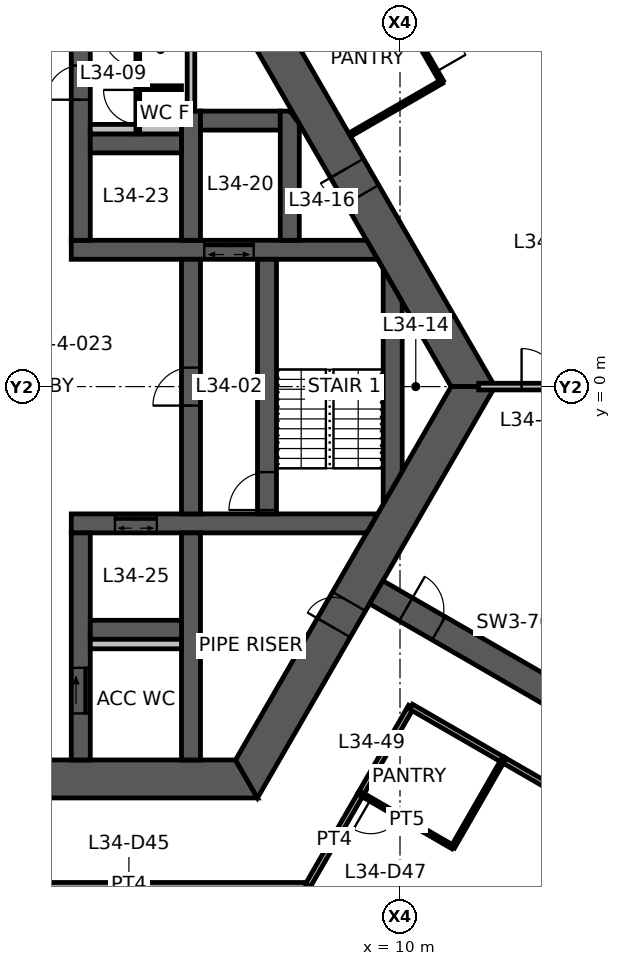
"""IFC4 building model, lengths in metres.
Left out: names, types, materials, properties, quantities, classifications, styles, units other than length and angle.
Written with IfcOpenShell. Run it as: python <this file> out.ifc"""

import sys

from ifc_helpers import new_model, si_unit, direction, frame, frame_2d, origin, place, context, subcontext, project, spatial, polyline, rectangle, outline, extrude, element, fill, save


model = new_model("IFC4")
c1 = context("Model", 3, precision=1e-05, world=origin(), true_north=direction((0.0, 1.0)))
c2 = subcontext(c1, "Body", "Model", "MODEL_VIEW")
j1 = project(units=[si_unit("LENGTHUNIT", "METRE"), si_unit("PLANEANGLEUNIT", "RADIAN")], contexts=[c1])
p1 = place(None, origin())
s1 = spatial("IfcSite", under=j1, at=p1, CompositionType="ELEMENT")
p2 = place(p1, origin())
s2 = spatial("IfcBuilding", under=s1, at=p2, CompositionType="ELEMENT")
p3 = place(p2, frame((0.0, 0.0, 137.0)))
s3 = spatial("IfcBuildingStorey", under=s2, at=p3, CompositionType="ELEMENT", Elevation=137.0)
p4 = place(p3, frame((11.922, 0.0, 0.0), z_axis=(0.0, 0.0, 1.0), x_axis=(-0.500004296715, 0.866022923061, 0.0)))
e1 = element("IfcWall", 1, at=p4, inside=s3, PredefinedType="SHEAR", context=c2, shape_type="SweptSolid", body=[
    extrude(outline(polyline([(-0.289, -0.5), (5.835, -0.5), (6.635, -0.5), (12.211, -0.5), (11.634, 0.5), (6.635, 0.5), (5.835, 0.5), (0.289, 0.5), (-0.289, -0.5)])), origin(), (0.0, 0.0, 1.0), 3.9),
])
p5 = place(p4, frame((5.835, 0.0, 0.0)))
e2 = element("IfcOpeningElement", 2, at=p5, cuts=e1, PredefinedType="OPENING", context=c2, shape_type="SweptSolid", body=[
    extrude(rectangle(XDim=0.8, YDim=2.1, at=frame_2d((0.4, 1.05))), frame((0.0, 0.51, 0.0), z_axis=(0.0, -1.0, 0.0), x_axis=(1.0, 0.0, 0.0)), (0.0, 0.0, 1.0), 1.02),
])
p6 = place(p3, frame((-5.961, -10.325, 0.0), z_axis=(0.0, 0.0, 1.0), x_axis=(1.0, 0.0, 0.0)))
e3 = element("IfcWall", 3, at=p6, inside=s3, PredefinedType="SHEAR", context=c2, shape_type="SweptSolid", body=[
    extrude(outline(polyline([(-0.289, -0.5), (5.461, -0.5), (6.461, -0.5), (12.211, -0.5), (11.634, 0.5), (6.461, 0.5), (5.461, 0.5), (0.289, 0.5), (-0.289, -0.5)])), origin(), (0.0, 0.0, 1.0), 3.9),
])
p7 = place(p6, frame((5.461, 0.0, 0.0)))
e4 = element("IfcOpeningElement", 4, at=p7, cuts=e3, PredefinedType="OPENING", context=c2, shape_type="SweptSolid", body=[
    extrude(rectangle(XDim=1.0, YDim=2.1, at=frame_2d((0.5, 1.05))), frame((0.0, 0.51, 0.0), z_axis=(0.0, -1.0, 0.0), x_axis=(1.0, 0.0, 0.0)), (0.0, 0.0, 1.0), 1.02),
])
p8 = place(p3, frame((5.961, -10.325, 0.0), z_axis=(0.0, 0.0, 1.0), x_axis=(0.500004296715, 0.866022923061, 0.0)))
e5 = element("IfcWall", 5, at=p8, inside=s3, PredefinedType="SHEAR", context=c2, shape_type="SweptSolid", body=[
    extrude(outline(polyline([(-0.289, -0.5), (4.594, -0.5), (5.394, -0.5), (12.211, -0.5), (11.634, 0.5), (5.394, 0.5), (4.594, 0.5), (0.289, 0.5), (-0.289, -0.5)])), origin(), (0.0, 0.0, 1.0), 3.9),
])
p9 = place(p8, frame((4.594, 0.0, 0.0)))
e6 = element("IfcOpeningElement", 6, at=p9, cuts=e5, PredefinedType="OPENING", context=c2, shape_type="SweptSolid", body=[
    extrude(rectangle(XDim=0.8, YDim=2.1, at=frame_2d((0.4, 1.05))), frame((0.0, 0.51, 0.0), z_axis=(0.0, -1.0, 0.0), x_axis=(1.0, 0.0, 0.0)), (0.0, 0.0, 1.0), 1.02),
])
p10 = place(p3, frame((9.375, -5.413, 0.0), z_axis=(0.0, 0.0, 1.0), x_axis=(0.866032377459, -0.499987921047, 0.0)))
e7 = element("IfcWall", 7, at=p10, inside=s3, PredefinedType="SHEAR", context=c2, shape_type="SweptSolid", body=[
    extrude(rectangle(XDim=7.696, YDim=0.7, at=frame_2d((3.848, 0.0))), origin(), (0.0, 0.0, 1.0), 3.9),
])
p11 = place(p10, frame((0.9, 0.0, 0.0)))
e8 = element("IfcOpeningElement", 8, at=p11, cuts=e7, PredefinedType="OPENING", context=c2, shape_type="SweptSolid", body=[
    extrude(rectangle(XDim=1.0, YDim=2.1, at=frame_2d((0.5, 1.05))), frame((0.0, 0.36, 0.0), z_axis=(0.0, -1.0, 0.0), x_axis=(1.0, 0.0, 0.0)), (0.0, 0.0, 1.0), 0.72),
])
p12 = place(p3, frame((1.35, 3.6, 0.0), z_axis=(0.0, 0.0, 1.0), x_axis=(1.0, 0.0, 0.0)))
e9 = element("IfcWall", 9, at=p12, inside=s3, PredefinedType="SHEAR", context=c2, shape_type="SweptSolid", body=[
    extrude(outline(polyline([(0.0, -0.25), (3.5, -0.25), (4.8, -0.25), (8.061, -0.25), (7.772, 0.25), (4.8, 0.25), (3.5, 0.25), (0.0, 0.25), (0.0, -0.25)])), origin(), (0.0, 0.0, 1.0), 3.9),
])
p13 = place(p12, frame((3.5, 0.0, 0.0)))
e10 = element("IfcOpeningElement", 10, at=p13, cuts=e9, PredefinedType="OPENING", context=c2, shape_type="SweptSolid", body=[
    extrude(rectangle(XDim=1.3, YDim=2.1, at=frame_2d((0.65, 1.05))), frame((0.0, 0.26, 0.0), z_axis=(0.0, -1.0, 0.0), x_axis=(1.0, 0.0, 0.0)), (0.0, 0.0, 1.0), 0.52),
])
p14 = place(p3, frame((1.35, -3.6, 0.0), z_axis=(0.0, 0.0, 1.0), x_axis=(1.0, 0.0, 0.0)))
e11 = element("IfcWall", 11, at=p14, inside=s3, PredefinedType="SHEAR", context=c2, shape_type="SweptSolid", body=[
    extrude(outline(polyline([(0.0, -0.25), (1.15, -0.25), (2.25, -0.25), (7.772, -0.25), (8.061, 0.25), (2.25, 0.25), (1.15, 0.25), (0.0, 0.25), (0.0, -0.25)])), origin(), (0.0, 0.0, 1.0), 3.9),
])
p15 = place(p14, frame((1.15, 0.0, 0.0)))
e12 = element("IfcOpeningElement", 12, at=p15, cuts=e11, PredefinedType="OPENING", context=c2, shape_type="SweptSolid", body=[
    extrude(rectangle(XDim=1.1, YDim=2.1, at=frame_2d((0.55, 1.05))), frame((0.0, 0.26, 0.0), z_axis=(0.0, -1.0, 0.0), x_axis=(1.0, 0.0, 0.0)), (0.0, 0.0, 1.0), 0.52),
])
p16 = place(p3, frame((1.6, 3.85, 0.0), z_axis=(0.0, 0.0, 1.0), x_axis=(0.0, 1.0, 0.0)))
e13 = element("IfcWall", 13, at=p16, inside=s3, PredefinedType="SHEAR", context=c2, shape_type="SweptSolid", body=[
    extrude(rectangle(XDim=5.975, YDim=0.5, at=frame_2d((2.987, 0.0))), origin(), (0.0, 0.0, 1.0), 3.9),
])
p17 = place(p16, frame((3.7, 0.0, 0.0)))
e14 = element("IfcOpeningElement", 14, at=p17, cuts=e13, PredefinedType="OPENING", context=c2, shape_type="SweptSolid", body=[
    extrude(rectangle(XDim=0.9, YDim=2.1, at=frame_2d((0.45, 1.05))), frame((0.0, 0.26, 0.0), z_axis=(0.0, -1.0, 0.0), x_axis=(1.0, 0.0, 0.0)), (0.0, 0.0, 1.0), 0.52),
])
p18 = place(p3, frame((1.6, -3.85, 0.0), z_axis=(0.0, 0.0, 1.0), x_axis=(0.0, -1.0, 0.0)))
e15 = element("IfcWall", 15, at=p18, inside=s3, PredefinedType="SHEAR", context=c2, shape_type="SweptSolid", body=[
    extrude(rectangle(XDim=5.975, YDim=0.5, at=frame_2d((2.987, 0.0))), origin(), (0.0, 0.0, 1.0), 3.9),
])
p19 = place(p18, frame((3.55, 0.0, 0.0)))
e16 = element("IfcOpeningElement", 16, at=p19, cuts=e15, PredefinedType="OPENING", context=c2, shape_type="SweptSolid", body=[
    extrude(rectangle(XDim=1.2, YDim=2.1, at=frame_2d((0.6, 1.05))), frame((0.0, 0.26, 0.0), z_axis=(0.0, -1.0, 0.0), x_axis=(1.0, 0.0, 0.0)), (0.0, 0.0, 1.0), 0.52),
])
p20 = place(p3, frame((4.5, -3.35, 0.0), z_axis=(0.0, 0.0, 1.0), x_axis=(0.0, 1.0, 0.0)))
e17 = element("IfcWall", 17, at=p20, inside=s3, PredefinedType="SHEAR", context=c2, shape_type="SweptSolid", body=[
    extrude(rectangle(XDim=6.7, YDim=0.5, at=frame_2d((3.35, 0.0))), origin(), (0.0, 0.0, 1.0), 3.9),
])
p21 = place(p20, frame((2.85, 0.0, 0.0)))
e18 = element("IfcOpeningElement", 18, at=p21, cuts=e17, PredefinedType="OPENING", context=c2, shape_type="SweptSolid", body=[
    extrude(rectangle(XDim=1.0, YDim=2.1, at=frame_2d((0.5, 1.05))), frame((0.0, 0.26, 0.0), z_axis=(0.0, -1.0, 0.0), x_axis=(1.0, 0.0, 0.0)), (0.0, 0.0, 1.0), 0.52),
])
p22 = place(p3, frame((6.5, -3.35, 0.0), z_axis=(0.0, 0.0, 1.0), x_axis=(0.0, 1.0, 0.0)))
e19 = element("IfcWall", 19, at=p22, inside=s3, PredefinedType="SHEAR", context=c2, shape_type="SweptSolid", body=[
    extrude(rectangle(XDim=6.7, YDim=0.5, at=frame_2d((3.35, 0.0))), origin(), (0.0, 0.0, 1.0), 3.9),
])
p23 = place(p22, frame((0.1, 0.0, 0.0)))
e20 = element("IfcOpeningElement", 20, at=p23, cuts=e19, PredefinedType="OPENING", context=c2, shape_type="SweptSolid", body=[
    extrude(rectangle(XDim=1.0, YDim=2.1, at=frame_2d((0.5, 1.05))), frame((0.0, 0.26, 0.0), z_axis=(0.0, -1.0, 0.0), x_axis=(1.0, 0.0, 0.0)), (0.0, 0.0, 1.0), 0.52),
])
p24 = place(p3, frame((4.5, 3.85, 0.0), z_axis=(0.0, 0.0, 1.0), x_axis=(0.0, 1.0, 0.0)))
e21 = element("IfcWall", 21, at=p24, inside=s3, PredefinedType="SHEAR", context=c2, shape_type="SweptSolid", body=[
    extrude(rectangle(XDim=3.4, YDim=0.5, at=frame_2d((1.7, 0.0))), origin(), (0.0, 0.0, 1.0), 3.9),
])
p25 = place(p3, frame((4.5, -3.85, 0.0), z_axis=(0.0, 0.0, 1.0), x_axis=(0.0, -1.0, 0.0)))
e22 = element("IfcWall", 22, at=p25, inside=s3, PredefinedType="SHEAR", context=c2, shape_type="SweptSolid", body=[
    extrude(rectangle(XDim=5.975, YDim=0.5, at=frame_2d((2.987, 0.0))), origin(), (0.0, 0.0, 1.0), 3.9),
])
for number, where, z_axis, x_axis in (
    (23, (1.85, 6.4, 0.0), (0.0, 0.0, 1.0), (1.0, 0.0, 0.0)),
    (24, (1.85, -6.4, 0.0), (0.0, 0.0, 1.0), (1.0, 0.0, 0.0)),
):
    element("IfcWall", number, at=place(p3, frame(where, z_axis=z_axis, x_axis=x_axis)), inside=s3, PredefinedType="SHEAR", context=c2, shape_type="SweptSolid", body=[
        extrude(rectangle(XDim=2.4, YDim=0.5, at=frame_2d((1.2, 0.0))), origin(), (0.0, 0.0, 1.0), 3.9),
    ])
p26 = place(p3, frame((4.75, 7.0, 0.0), z_axis=(0.0, 0.0, 1.0), x_axis=(1.0, 0.0, 0.0)))
e25 = element("IfcWall", 25, at=p26, inside=s3, PredefinedType="SHEAR", context=c2, shape_type="SweptSolid", body=[
    extrude(rectangle(XDim=2.1, YDim=0.5, at=frame_2d((1.05, 0.0))), origin(), (0.0, 0.0, 1.0), 3.9),
])
p27 = place(p3, frame((7.1, 3.85, 0.0), z_axis=(0.0, 0.0, 1.0), x_axis=(0.0, 1.0, 0.0)))
e26 = element("IfcWall", 26, at=p27, inside=s3, PredefinedType="SHEAR", context=c2, shape_type="SweptSolid", body=[
    extrude(outline(polyline([(0.0, -0.25), (3.069, -0.25), (3.4, 0.0), (3.4, 0.25), (0.0, 0.25), (0.0, -0.25)])), origin(), (0.0, 0.0, 1.0), 3.9),
])
p28 = place(p3, frame((9.808, -2.662, 0.0), z_axis=(0.0, 0.0, 1.0), x_axis=(0.0, 1.0, 0.0)))
e27 = element("IfcWall", 27, at=p28, inside=s3, PredefinedType="SHEAR", context=c2, shape_type="SweptSolid", body=[
    extrude(outline(polyline([(0.433, -0.25), (4.892, -0.25), (5.758, 0.25), (-0.433, 0.25), (0.433, -0.25)])), origin(), (0.0, 0.0, 1.0), 3.9),
])
p29 = place(p3, frame((4.5, 7.25, 0.0), z_axis=(0.0, 0.0, 1.0), x_axis=(0.0, 1.0, 0.0)))
e28 = element("IfcWall", 28, at=p29, inside=s3, PredefinedType="STANDARD", context=c2, shape_type="SweptSolid", body=[
    extrude(rectangle(XDim=2.575, YDim=0.2, at=frame_2d((1.288, 0.0))), origin(), (0.0, 0.0, 1.0), 3.9),
])
for number, where, z_axis, x_axis in (
    (29, (1.85, 6.775, 0.0), (0.0, 0.0, 1.0), (1.0, 0.0, 0.0)),
    (30, (1.85, -6.775, 0.0), (0.0, 0.0, 1.0), (1.0, 0.0, 0.0)),
):
    element("IfcWall", number, at=place(p3, frame(where, z_axis=z_axis, x_axis=x_axis)), inside=s3, PredefinedType="PLUMBINGWALL", context=c2, shape_type="SweptSolid", body=[
        extrude(rectangle(XDim=2.4, YDim=0.25, at=frame_2d((1.2, 0.0))), origin(), (0.0, 0.0, 1.0), 3.9),
    ])
p30 = place(p3, frame((3.1, 6.65, 0.0), z_axis=(0.0, 0.0, 1.0), x_axis=(0.0, 1.0, 0.0)))
e31 = element("IfcWall", 31, at=p30, inside=s3, PredefinedType="PARTITIONING", context=c2, shape_type="SweptSolid", body=[
    extrude(rectangle(XDim=3.175, YDim=0.1, at=frame_2d((1.587, 0.0))), origin(), (0.0, 0.0, 1.0), 2.95),
])
p31 = place(p30, frame((0.258, 0.0, 0.0)))
e32 = element("IfcOpeningElement", 32, at=p31, cuts=e31, PredefinedType="OPENING", context=c2, shape_type="SweptSolid", body=[
    extrude(rectangle(XDim=0.9, YDim=2.1, at=frame_2d((0.45, 1.05))), frame((0.0, 0.06, 0.0), z_axis=(0.0, -1.0, 0.0), x_axis=(1.0, 0.0, 0.0)), (0.0, 0.0, 1.0), 0.12),
])
p32 = place(p30, frame((1.771, 0.0, 0.0)))
e33 = element("IfcOpeningElement", 33, at=p32, cuts=e31, PredefinedType="OPENING", context=c2, shape_type="SweptSolid", body=[
    extrude(rectangle(XDim=0.9, YDim=2.1, at=frame_2d((0.45, 1.05))), frame((0.0, 0.06, 0.0), z_axis=(0.0, -1.0, 0.0), x_axis=(1.0, 0.0, 0.0)), (0.0, 0.0, 1.0), 0.12),
])
p33 = place(p3, frame((3.15, 7.866, 0.0), z_axis=(0.0, 0.0, 1.0), x_axis=(1.0, 0.0, 0.0)))
e34 = element("IfcWall", 34, at=p33, inside=s3, PredefinedType="PARTITIONING", context=c2, shape_type="SweptSolid", body=[
    extrude(rectangle(XDim=1.1, YDim=0.1, at=frame_2d((0.55, 0.0))), origin(), (0.0, 0.0, 1.0), 2.95),
])
p34 = place(p3, frame((12.07, 0.0, 0.0), z_axis=(0.0, 0.0, 1.0), x_axis=(1.0, 0.0, 0.0)))
e35 = element("IfcWall", 35, at=p34, inside=s3, PredefinedType="PARTITIONING", context=c2, shape_type="SweptSolid", body=[
    extrude(rectangle(XDim=7.93, YDim=0.175, at=frame_2d((3.965, 0.0))), origin(), (0.0, 0.0, 1.0), 3.05),
])
p35 = place(p34, frame((1.13, 0.0, 0.0)))
e36 = element("IfcOpeningElement", 36, at=p35, cuts=e35, PredefinedType="OPENING", context=c2, shape_type="SweptSolid", body=[
    extrude(rectangle(XDim=1.0, YDim=2.1, at=frame_2d((0.5, 1.05))), frame((0.0, 0.098, 0.0), z_axis=(0.0, -1.0, 0.0), x_axis=(1.0, 0.0, 0.0)), (0.0, 0.0, 1.0), 0.195),
])
p36 = place(p3, frame((9.6, 10.623, 0.0), z_axis=(0.0, 0.0, 1.0), x_axis=(0.499990139034, -0.866031096941, 0.0)))
e37 = element("IfcWall", 37, at=p36, inside=s3, PredefinedType="PARTITIONING", context=c2, shape_type="SweptSolid", body=[
    extrude(rectangle(XDim=3.0, YDim=0.1, at=frame_2d((1.5, 0.0))), origin(), (0.0, 0.0, 1.0), 2.95),
])
p37 = place(p36, frame((1.8, 0.0, 0.0)))
e38 = element("IfcOpeningElement", 38, at=p37, cuts=e37, PredefinedType="OPENING", context=c2, shape_type="SweptSolid", body=[
    extrude(rectangle(XDim=0.9, YDim=2.1, at=frame_2d((0.45, 1.05))), frame((0.0, 0.06, 0.0), z_axis=(0.0, -1.0, 0.0), x_axis=(1.0, 0.0, 0.0)), (0.0, 0.0, 1.0), 0.12),
])
p38 = place(p3, frame((11.1, 8.025, 0.0), z_axis=(0.0, 0.0, 1.0), x_axis=(-0.866056901187, -0.49994544093, 0.0)))
e39 = element("IfcWall", 39, at=p38, inside=s3, PredefinedType="PARTITIONING", context=c2, shape_type="SweptSolid", body=[
    extrude(rectangle(XDim=2.78, YDim=0.1, at=frame_2d((1.39, 0.0))), origin(), (0.0, 0.0, 1.0), 2.95),
])
p39 = place(p3, frame((10.292, -8.425, 0.0), z_axis=(0.0, 0.0, 1.0), x_axis=(-0.499966561876, -0.866044708433, 0.0)))
e40 = element("IfcWall", 40, at=p39, inside=s3, PredefinedType="PARTITIONING", context=c2, shape_type="SweptSolid", body=[
    extrude(rectangle(XDim=2.655, YDim=0.15, at=frame_2d((1.328, 0.0))), origin(), (0.0, 0.0, 1.0), 2.95),
])
p40 = place(p3, frame((12.721, -9.827, 0.0), z_axis=(0.0, 0.0, 1.0), x_axis=(-0.866049342339, 0.499958534914, 0.0)))
e41 = element("IfcWall", 41, at=p40, inside=s3, PredefinedType="PARTITIONING", context=c2, shape_type="SweptSolid", body=[
    extrude(rectangle(XDim=2.805, YDim=0.15, at=frame_2d((1.402, 0.0))), origin(), (0.0, 0.0, 1.0), 2.95),
])
p41 = place(p3, frame((7.578, -13.125, 0.0), z_axis=(0.0, 0.0, 1.0), x_axis=(-1.0, 0.0, 0.0)))
e42 = element("IfcWall", 42, at=p41, inside=s3, PredefinedType="PARTITIONING", context=c2, shape_type="SweptSolid", body=[
    extrude(rectangle(XDim=9.422, YDim=0.15, at=frame_2d((4.711, 0.0))), origin(), (0.0, 0.0, 1.0), 2.95),
])
p42 = place(p41, frame((4.211, 0.0, 0.0)))
e43 = element("IfcOpeningElement", 43, at=p42, cuts=e42, PredefinedType="OPENING", context=c2, shape_type="SweptSolid", body=[
    extrude(rectangle(XDim=1.0, YDim=2.1, at=frame_2d((0.5, 1.05))), frame((0.0, 0.085, 0.0), z_axis=(0.0, -1.0, 0.0), x_axis=(1.0, 0.0, 0.0)), (0.0, 0.0, 1.0), 0.17),
])
p43 = place(p3, frame((8.969, -10.716, 0.0), z_axis=(0.0, 0.0, 1.0), x_axis=(-0.500008568482, -0.866020456713, 0.0)))
e44 = element("IfcWall", 44, at=p43, inside=s3, PredefinedType="PARTITIONING", context=c2, shape_type="SweptSolid", body=[
    extrude(rectangle(XDim=2.782, YDim=0.15, at=frame_2d((1.391, 0.0))), origin(), (0.0, 0.0, 1.0), 2.95),
])
p44 = place(p3, frame((17.021, -12.31, 0.0), z_axis=(0.0, 0.0, 1.0), x_axis=(-0.866018071205, 0.500012700186, 0.0)))
e45 = element("IfcWall", 45, at=p44, inside=s3, PredefinedType="PARTITIONING", context=c2, shape_type="SweptSolid", body=[
    extrude(rectangle(XDim=4.975, YDim=0.15, at=frame_2d((2.488, 0.0))), origin(), (0.0, 0.0, 1.0), 2.95),
])
p45 = place(p3, frame((11.392, -12.119, 0.0), z_axis=(0.0, 0.0, 1.0), x_axis=(-0.865255114713, 0.501331812737, 0.0)))
e46 = element("IfcWall", 46, at=p45, inside=s3, PredefinedType="PARTITIONING", context=c2, shape_type="SweptSolid", body=[
    extrude(rectangle(XDim=2.8, YDim=0.1, at=frame_2d((1.4, 0.0))), origin(), (0.0, 0.0, 1.0), 2.95),
])
p46 = place(p45, frame((1.6, 0.0, 0.0)))
e47 = element("IfcOpeningElement", 47, at=p46, cuts=e46, PredefinedType="OPENING", context=c2, shape_type="SweptSolid", body=[
    extrude(rectangle(XDim=0.9, YDim=2.1, at=frame_2d((0.45, 1.05))), frame((0.0, 0.06, 0.0), z_axis=(0.0, -1.0, 0.0), x_axis=(1.0, 0.0, 0.0)), (0.0, 0.0, 1.0), 0.12),
])
p47 = place(p3, frame((12.713, -9.822, 0.0), z_axis=(0.0, 0.0, 1.0), x_axis=(-0.49852824611, -0.866873455488, 0.0)))
e48 = element("IfcWall", 48, at=p47, inside=s3, PredefinedType="PARTITIONING", context=c2, shape_type="SweptSolid", body=[
    extrude(rectangle(XDim=2.65, YDim=0.1, at=frame_2d((1.325, 0.0))), origin(), (0.0, 0.0, 1.0), 2.95),
])
p48 = place(p5, origin())
e49 = element("IfcDoor", 49, at=p48, inside=s3, OperationType="SINGLE_SWING_RIGHT", PredefinedType="DOOR", context=c2, shape_type="SweptSolid", body=[
    extrude(rectangle(XDim=0.8, YDim=2.1, at=frame_2d((0.4, 1.05))), frame((0.0, 0.025, 0.0), z_axis=(0.0, -1.0, 0.0), x_axis=(1.0, 0.0, 0.0)), (0.0, 0.0, 1.0), 0.05),
])
fill(e2, e49)
p49 = place(p9, origin())
e50 = element("IfcDoor", 50, at=p49, inside=s3, OperationType="SINGLE_SWING_LEFT", PredefinedType="DOOR", context=c2, shape_type="SweptSolid", body=[
    extrude(rectangle(XDim=0.8, YDim=2.1, at=frame_2d((0.4, 1.05))), frame((0.0, 0.025, 0.0), z_axis=(0.0, -1.0, 0.0), x_axis=(1.0, 0.0, 0.0)), (0.0, 0.0, 1.0), 0.05),
])
fill(e6, e50)
p50 = place(p21, origin())
e51 = element("IfcDoor", 51, at=p50, inside=s3, OperationType="SINGLE_SWING_LEFT", PredefinedType="DOOR", context=c2, shape_type="SweptSolid", body=[
    extrude(rectangle(XDim=1.0, YDim=2.1, at=frame_2d((0.5, 1.05))), frame((0.0, 0.025, 0.0), z_axis=(0.0, -1.0, 0.0), x_axis=(1.0, 0.0, 0.0)), (0.0, 0.0, 1.0), 0.05),
])
fill(e18, e51)
p51 = place(p23, origin())
e52 = element("IfcDoor", 52, at=p51, inside=s3, OperationType="SINGLE_SWING_LEFT", PredefinedType="DOOR", context=c2, shape_type="SweptSolid", body=[
    extrude(rectangle(XDim=1.0, YDim=2.1, at=frame_2d((0.5, 1.05))), frame((0.0, 0.025, 0.0), z_axis=(0.0, -1.0, 0.0), x_axis=(1.0, 0.0, 0.0)), (0.0, 0.0, 1.0), 0.05),
])
fill(e20, e52)
p52 = place(p17, origin())
e53 = element("IfcDoor", 53, at=p52, inside=s3, OperationType="SINGLE_SWING_LEFT", PredefinedType="DOOR", context=c2, shape_type="SweptSolid", body=[
    extrude(rectangle(XDim=0.9, YDim=2.1, at=frame_2d((0.45, 1.05))), frame((0.0, 0.025, 0.0), z_axis=(0.0, -1.0, 0.0), x_axis=(1.0, 0.0, 0.0)), (0.0, 0.0, 1.0), 0.05),
])
fill(e14, e53)
p53 = place(p19, origin())
e54 = element("IfcDoor", 54, at=p53, inside=s3, OperationType="SLIDING_TO_LEFT", PredefinedType="DOOR", context=c2, shape_type="SweptSolid", body=[
    extrude(rectangle(XDim=1.2, YDim=2.1, at=frame_2d((0.6, 1.05))), frame((0.0, 0.025, 0.0), z_axis=(0.0, -1.0, 0.0), x_axis=(1.0, 0.0, 0.0)), (0.0, 0.0, 1.0), 0.05),
])
fill(e16, e54)
p54 = place(p11, origin())
e55 = element("IfcDoor", 55, at=p54, inside=s3, OperationType="SINGLE_SWING_LEFT", PredefinedType="DOOR", context=c2, shape_type="SweptSolid", body=[
    extrude(rectangle(XDim=1.0, YDim=2.1, at=frame_2d((0.5, 1.05))), frame((0.0, 0.025, 0.0), z_axis=(0.0, -1.0, 0.0), x_axis=(1.0, 0.0, 0.0)), (0.0, 0.0, 1.0), 0.05),
])
fill(e8, e55)
p55 = place(p31, origin())
e56 = element("IfcDoor", 56, at=p55, inside=s3, OperationType="SINGLE_SWING_RIGHT", PredefinedType="DOOR", context=c2, shape_type="SweptSolid", body=[
    extrude(rectangle(XDim=0.9, YDim=2.1, at=frame_2d((0.45, 1.05))), frame((0.0, 0.025, 0.0), z_axis=(0.0, -1.0, 0.0), x_axis=(1.0, 0.0, 0.0)), (0.0, 0.0, 1.0), 0.05),
])
fill(e32, e56)
p56 = place(p32, origin())
e57 = element("IfcDoor", 57, at=p56, inside=s3, OperationType="SINGLE_SWING_RIGHT", PredefinedType="DOOR", context=c2, shape_type="SweptSolid", body=[
    extrude(rectangle(XDim=0.9, YDim=2.1, at=frame_2d((0.45, 1.05))), frame((0.0, 0.025, 0.0), z_axis=(0.0, -1.0, 0.0), x_axis=(1.0, 0.0, 0.0)), (0.0, 0.0, 1.0), 0.05),
])
fill(e33, e57)
p57 = place(p35, origin())
e58 = element("IfcDoor", 58, at=p57, inside=s3, OperationType="SINGLE_SWING_LEFT", PredefinedType="DOOR", context=c2, shape_type="SweptSolid", body=[
    extrude(rectangle(XDim=1.0, YDim=2.1, at=frame_2d((0.5, 1.05))), frame((0.0, 0.025, 0.0), z_axis=(0.0, -1.0, 0.0), x_axis=(1.0, 0.0, 0.0)), (0.0, 0.0, 1.0), 0.05),
])
fill(e36, e58)
p58 = place(p37, origin())
e59 = element("IfcDoor", 59, at=p58, inside=s3, OperationType="SINGLE_SWING_RIGHT", PredefinedType="DOOR", context=c2, shape_type="SweptSolid", body=[
    extrude(rectangle(XDim=0.9, YDim=2.1, at=frame_2d((0.45, 1.05))), frame((0.0, 0.025, 0.0), z_axis=(0.0, -1.0, 0.0), x_axis=(1.0, 0.0, 0.0)), (0.0, 0.0, 1.0), 0.05),
])
fill(e38, e59)
p59 = place(p42, origin())
e60 = element("IfcDoor", 60, at=p59, inside=s3, OperationType="SINGLE_SWING_LEFT", PredefinedType="DOOR", context=c2, shape_type="SweptSolid", body=[
    extrude(rectangle(XDim=1.0, YDim=2.1, at=frame_2d((0.5, 1.05))), frame((0.0, 0.025, 0.0), z_axis=(0.0, -1.0, 0.0), x_axis=(1.0, 0.0, 0.0)), (0.0, 0.0, 1.0), 0.05),
])
fill(e43, e60)
p60 = place(p46, origin())
e61 = element("IfcDoor", 61, at=p60, inside=s3, OperationType="SINGLE_SWING_RIGHT", PredefinedType="DOOR", context=c2, shape_type="SweptSolid", body=[
    extrude(rectangle(XDim=0.9, YDim=2.1, at=frame_2d((0.45, 1.05))), frame((0.0, 0.025, 0.0), z_axis=(0.0, -1.0, 0.0), x_axis=(1.0, 0.0, 0.0)), (0.0, 0.0, 1.0), 0.05),
])
fill(e47, e61)
p61 = place(p15, origin())
e62 = element("IfcDoor", 62, at=p61, inside=s3, OperationType="DOUBLE_DOOR_SLIDING", PredefinedType="DOOR", context=c2, shape_type="SweptSolid", body=[
    extrude(rectangle(XDim=1.1, YDim=2.1, at=frame_2d((0.55, 1.05))), frame((0.0, 0.025, 0.0), z_axis=(0.0, -1.0, 0.0), x_axis=(1.0, 0.0, 0.0)), (0.0, 0.0, 1.0), 0.05),
])
fill(e12, e62)
p62 = place(p13, origin())
e63 = element("IfcDoor", 63, at=p62, inside=s3, OperationType="DOUBLE_DOOR_SLIDING", PredefinedType="DOOR", context=c2, shape_type="SweptSolid", body=[
    extrude(rectangle(XDim=1.3, YDim=2.1, at=frame_2d((0.65, 1.05))), frame((0.0, 0.025, 0.0), z_axis=(0.0, -1.0, 0.0), x_axis=(1.0, 0.0, 0.0)), (0.0, 0.0, 1.0), 0.05),
])
fill(e10, e63)
save(model, sys.argv[1])
